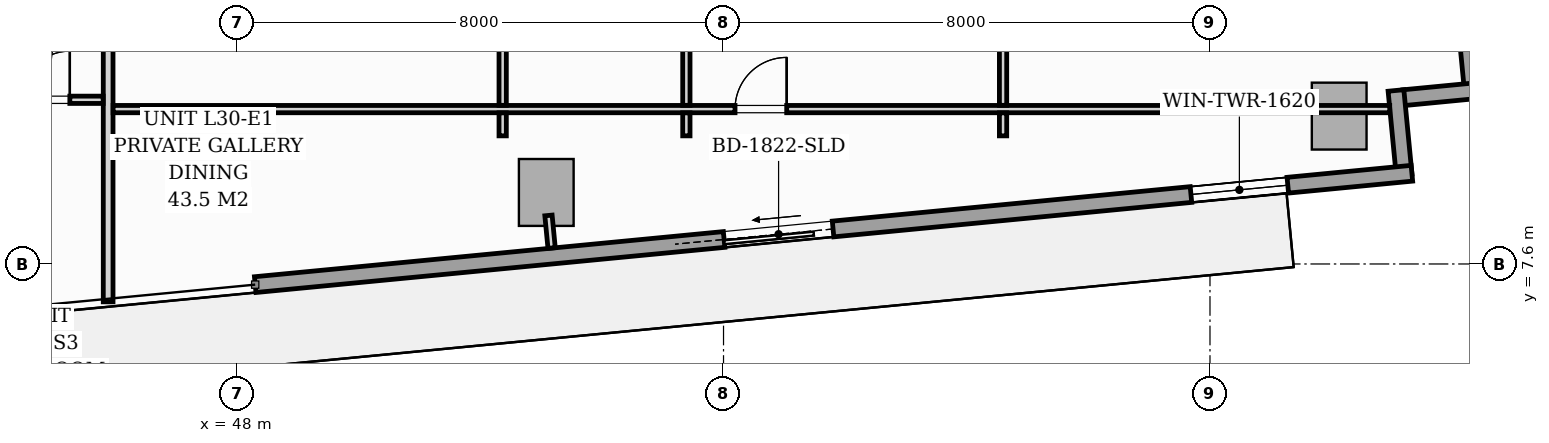
"""IFC4 building model, lengths in metres.
Left out: names, types, materials, properties, quantities, classifications, styles, units other than length and angle.
Written with IfcOpenShell. Run it as: python <this file> out.ifc"""

import sys

from ifc_helpers import new_model, si_unit, direction, frame, frame_2d, origin, origin_2d, place, context, subcontext, project, spatial, rectangle, extrude, source, transform, mapped, element, fill, save


model = new_model("IFC4")
c1 = context("Model", 3, precision=1e-05, world=origin(), true_north=direction((0.0, 1.0)))
c2 = subcontext(c1, "Body", "Model", "MODEL_VIEW")
j1 = project(units=[si_unit("LENGTHUNIT", "METRE"), si_unit("PLANEANGLEUNIT", "RADIAN")], contexts=[c1])
p1 = place(None, origin())
s1 = spatial("IfcSite", under=j1, at=p1, CompositionType="ELEMENT")
p2 = place(p1, origin())
s2 = spatial("IfcBuilding", under=s1, at=p2, CompositionType="ELEMENT")
p3 = place(p2, frame((0.0, 0.0, 106.6)))
s3 = spatial("IfcBuildingStorey", under=s2, at=p3, CompositionType="ELEMENT", Elevation=106.6)
m1 = source(origin(), c2, "Body", "SweptSolid", [
    extrude(rectangle(XDim=0.9, YDim=1.1, at=origin_2d()), origin(), (0.0, 0.0, 1.0), 3.196),
])
for number, where, z_axis, x_axis in (
    (1, (53.085, 8.776, 0.002), (0.0, 0.0, 1.0), (0.995, 0.096, 0.0)),
    (2, (66.125, 10.032, 0.002), (0.0, 0.0, 1.0), (0.995, 0.096, 0.0)),
):
    element("IfcColumn", number, at=place(p3, frame(where, z_axis=z_axis, x_axis=x_axis)), inside=s3, PredefinedType="COLUMN", context=c2, shape_type="MappedRepresentation", body=[
        mapped(m1, transform((0.0, 0.0, 0.0), scale=1.0)),
    ])
p4 = place(p3, frame((68.183, 11.817, 0.0), z_axis=(0.0, 0.0, 1.0), x_axis=(0.095915846097, -0.995389446633, 0.0)))
e3 = element("IfcWall", 3, at=p4, inside=s3, PredefinedType="STANDARD", context=c2, shape_type="SweptSolid", body=[
    extrude(rectangle(XDim=1.395, YDim=0.26, at=frame_2d((0.697, 0.0))), origin(), (0.0, 0.0, 1.0), 2.94),
])
p5 = place(p3, frame((68.574, 10.469, 0.0), z_axis=(0.0, 0.0, 1.0), x_axis=(-0.99540774648, -0.095725744959, 0.0)))
e4 = element("IfcWall", 4, at=p5, inside=s3, PredefinedType="STANDARD", context=c2, shape_type="SweptSolid", body=[
    extrude(rectangle(XDim=1.395, YDim=0.26, at=frame_2d((0.698, 0.0))), origin(), (0.0, 0.0, 1.0), 2.94),
])
p6 = place(p3, frame((67.059, 10.453, 0.0), z_axis=(0.0, 0.0, 1.0), x_axis=(0.095915846097, -0.995389446633, 0.0)))
e5 = element("IfcWall", 5, at=p6, inside=s3, PredefinedType="STANDARD", context=c2, shape_type="SweptSolid", body=[
    extrude(rectangle(XDim=1.395, YDim=0.26, at=frame_2d((0.697, 0.0))), origin(), (0.0, 0.0, 1.0), 2.94),
])
p7 = place(p3, frame((67.32, 9.092, 0.0), z_axis=(0.0, 0.0, 1.0), x_axis=(-0.995396521236, -0.095842399342, 0.0)))
e6 = element("IfcWall", 6, at=p7, inside=s3, PredefinedType="STANDARD", context=c2, shape_type="SweptSolid", body=[
    extrude(rectangle(XDim=19.11, YDim=0.26, at=frame_2d((9.555, 0.0))), origin(), (0.0, 0.0, 1.0), 2.94),
])
p8 = place(p7, frame((9.563, 0.0, 0.0)))
e7 = element("IfcOpeningElement", 7, at=p8, cuts=e6, PredefinedType="OPENING", context=c2, shape_type="SweptSolid", body=[
    extrude(rectangle(XDim=1.8, YDim=2.06, at=frame_2d((0.9, 1.03))), frame((0.0, 0.14, 0.0), z_axis=(0.0, -1.0, 0.0), x_axis=(1.0, 0.0, 0.0)), (0.0, 0.0, 1.0), 0.28),
])
p9 = place(p7, frame((2.05, 0.0, 0.65)))
e8 = element("IfcOpeningElement", 8, at=p9, cuts=e6, PredefinedType="OPENING", context=c2, shape_type="SweptSolid", body=[
    extrude(rectangle(XDim=1.6, YDim=1.5, at=frame_2d((0.8, 0.75))), frame((0.0, 0.14, 0.0), z_axis=(0.0, -1.0, 0.0), x_axis=(1.0, 0.0, 0.0)), (0.0, 0.0, 1.0), 0.28),
])
p10 = place(p3, frame((45.88, 6.977, 0.0), z_axis=(0.0, 0.0, 1.0), x_axis=(0.0, 1.0, 0.0)))
e9 = element("IfcWall", 9, at=p10, inside=s3, PredefinedType="PARTITIONING", context=c2, shape_type="SweptSolid", body=[
    extrude(rectangle(XDim=5.491, YDim=0.16, at=frame_2d((2.745, 0.0))), origin(), (0.0, 0.0, 1.0), 2.94),
])
p11 = place(p3, frame((41.7, 10.3, 0.0), z_axis=(0.0, 0.0, 1.0), x_axis=(1.0, 0.0, 0.0)))
e10 = element("IfcWall", 10, at=p11, inside=s3, PredefinedType="PARTITIONING", context=c2, shape_type="SweptSolid", body=[
    extrude(rectangle(XDim=4.098, YDim=0.12, at=frame_2d((2.049, 0.0))), origin(), (0.0, 0.0, 1.0), 2.94),
])
p12 = place(p11, frame((0.675, 0.0, 0.0)))
e11 = element("IfcOpeningElement", 11, at=p12, cuts=e10, PredefinedType="OPENING", context=c2, shape_type="SweptSolid", body=[
    extrude(rectangle(XDim=0.85, YDim=2.05, at=frame_2d((0.425, 1.025))), frame((0.0, 0.07, 0.0), z_axis=(0.0, -1.0, 0.0), x_axis=(1.0, 0.0, 0.0)), (0.0, 0.0, 1.0), 0.14),
])
p13 = place(p11, frame((2.75, 0.0, 0.0)))
e12 = element("IfcOpeningElement", 12, at=p13, cuts=e10, PredefinedType="OPENING", context=c2, shape_type="SweptSolid", body=[
    extrude(rectangle(XDim=0.8, YDim=2.02, at=frame_2d((0.4, 1.01))), frame((0.0, 0.07, 0.0), z_axis=(0.0, -1.0, 0.0), x_axis=(1.0, 0.0, 0.0)), (0.0, 0.0, 1.0), 0.14),
])
p14 = place(p3, frame((45.962, 10.147, 0.0), z_axis=(0.0, 0.0, 1.0), x_axis=(1.0, 0.0, 0.0)))
e13 = element("IfcWall", 13, at=p14, inside=s3, PredefinedType="PARTITIONING", context=c2, shape_type="SweptSolid", body=[
    extrude(rectangle(XDim=20.994, YDim=0.12, at=frame_2d((10.497, 0.0))), origin(), (0.0, 0.0, 1.0), 2.31),
])
p15 = place(p14, frame((10.227, 0.0, 0.0)))
e14 = element("IfcOpeningElement", 14, at=p15, cuts=e13, PredefinedType="OPENING", context=c2, shape_type="SweptSolid", body=[
    extrude(rectangle(XDim=0.85, YDim=2.05, at=frame_2d((0.425, 1.025))), frame((0.0, 0.07, 0.0), z_axis=(0.0, -1.0, 0.0), x_axis=(1.0, 0.0, 0.0)), (0.0, 0.0, 1.0), 0.14),
])
p16 = place(p3, frame((60.597, 9.707, 0.0), z_axis=(0.0, 0.0, 1.0), x_axis=(0.0, 1.0, 0.0)))
e15 = element("IfcWall", 15, at=p16, inside=s3, PredefinedType="PARTITIONING", context=c2, shape_type="SweptSolid", body=[
    extrude(rectangle(XDim=0.378, YDim=0.12, at=frame_2d((0.189, 0.0))), origin(), (0.0, 0.0, 1.0), 2.94),
])
p17 = place(p3, frame((60.597, 10.209, 0.0), z_axis=(0.0, 0.0, 1.0), x_axis=(0.0, 1.0, 0.0)))
e16 = element("IfcWall", 16, at=p17, inside=s3, PredefinedType="PARTITIONING", context=c2, shape_type="SweptSolid", body=[
    extrude(rectangle(XDim=11.087, YDim=0.12, at=frame_2d((5.543, 0.0))), origin(), (0.0, 0.0, 1.0), 2.94),
])
p18 = place(p17, frame((5.118, 0.0, 0.0)))
e17 = element("IfcOpeningElement", 17, at=p18, cuts=e16, PredefinedType="OPENING", context=c2, shape_type="SweptSolid", body=[
    extrude(rectangle(XDim=0.85, YDim=2.05, at=frame_2d((0.425, 1.025))), frame((0.0, 0.07, 0.0), z_axis=(0.0, -1.0, 0.0), x_axis=(1.0, 0.0, 0.0)), (0.0, 0.0, 1.0), 0.14),
])
p19 = place(p3, frame((55.389, 9.707, 0.0), z_axis=(0.0, 0.0, 1.0), x_axis=(0.0, 1.0, 0.0)))
e18 = element("IfcWall", 18, at=p19, inside=s3, PredefinedType="PARTITIONING", context=c2, shape_type="SweptSolid", body=[
    extrude(rectangle(XDim=0.378, YDim=0.12, at=frame_2d((0.189, 0.0))), origin(), (0.0, 0.0, 1.0), 2.94),
])
p20 = place(p3, frame((55.389, 10.209, 0.0), z_axis=(0.0, 0.0, 1.0), x_axis=(0.0, 1.0, 0.0)))
e19 = element("IfcWall", 19, at=p20, inside=s3, PredefinedType="PARTITIONING", context=c2, shape_type="SweptSolid", body=[
    extrude(rectangle(XDim=11.087, YDim=0.12, at=frame_2d((5.543, 0.0))), origin(), (0.0, 0.0, 1.0), 2.94),
])
p21 = place(p20, frame((5.118, 0.0, 0.0)))
e20 = element("IfcOpeningElement", 20, at=p21, cuts=e19, PredefinedType="OPENING", context=c2, shape_type="SweptSolid", body=[
    extrude(rectangle(XDim=0.85, YDim=2.05, at=frame_2d((0.425, 1.025))), frame((0.0, 0.07, 0.0), z_axis=(0.0, -1.0, 0.0), x_axis=(1.0, 0.0, 0.0)), (0.0, 0.0, 1.0), 0.14),
])
p22 = place(p3, frame((52.368, 9.707, 0.0), z_axis=(0.0, 0.0, 1.0), x_axis=(0.0, 1.0, 0.0)))
e21 = element("IfcWall", 21, at=p22, inside=s3, PredefinedType="PARTITIONING", context=c2, shape_type="SweptSolid", body=[
    extrude(rectangle(XDim=0.378, YDim=0.12, at=frame_2d((0.189, 0.0))), origin(), (0.0, 0.0, 1.0), 2.94),
])
p23 = place(p3, frame((52.368, 10.209, 0.0), z_axis=(0.0, 0.0, 1.0), x_axis=(0.0, 1.0, 0.0)))
e22 = element("IfcWall", 22, at=p23, inside=s3, PredefinedType="PARTITIONING", context=c2, shape_type="SweptSolid", body=[
    extrude(rectangle(XDim=11.087, YDim=0.12, at=frame_2d((5.543, 0.0))), origin(), (0.0, 0.0, 1.0), 2.94),
])
p24 = place(p23, frame((5.118, 0.0, 0.0)))
e23 = element("IfcOpeningElement", 23, at=p24, cuts=e22, PredefinedType="OPENING", context=c2, shape_type="SweptSolid", body=[
    extrude(rectangle(XDim=0.85, YDim=2.05, at=frame_2d((0.425, 1.025))), frame((0.0, 0.07, 0.0), z_axis=(0.0, -1.0, 0.0), x_axis=(1.0, 0.0, 0.0)), (0.0, 0.0, 1.0), 0.14),
])
p25 = place(p3, frame((53.121, 8.398, 0.0), z_axis=(0.0, 0.0, 1.0), x_axis=(0.096179204763, -0.995364034196, 0.0)))
e24 = element("IfcWall", 24, at=p25, inside=s3, PredefinedType="PARTITIONING", context=c2, shape_type="SweptSolid", body=[
    extrude(rectangle(XDim=0.538, YDim=0.12, at=frame_2d((0.269, 0.0))), origin(), (0.0, 0.0, 1.0), 2.94),
])
m2 = source(origin(), c2, "Body", "SweptSolid", [
    extrude(rectangle(XDim=1.8, YDim=2.06, at=frame_2d((0.9, 1.03))), frame((0.0, 0.025, 0.0), z_axis=(0.0, -1.0, 0.0), x_axis=(1.0, 0.0, 0.0)), (0.0, 0.0, 1.0), 0.05),
])
p26 = place(p8, origin())
e25 = element("IfcDoor", 25, at=p26, inside=s3, OperationType="SLIDING_TO_RIGHT", PredefinedType="DOOR", context=c2, shape_type="MappedRepresentation", body=[
    mapped(m2, transform((0.0, 0.0, 0.0), scale=1.0)),
])
fill(e7, e25)
m3 = source(origin(), c2, "Body", "SweptSolid", [
    extrude(rectangle(XDim=1.6, YDim=1.5, at=frame_2d((0.8, 0.75))), frame((0.0, 0.03, 0.0), z_axis=(0.0, -1.0, 0.0), x_axis=(1.0, 0.0, 0.0)), (0.0, 0.0, 1.0), 0.06),
])
p27 = place(p9, origin())
e26 = element("IfcWindow", 26, at=p27, inside=s3, PartitioningType="SINGLE_PANEL", PredefinedType="WINDOW", context=c2, shape_type="MappedRepresentation", body=[
    mapped(m3, transform((0.0, 0.0, 0.0), scale=1.0)),
])
fill(e8, e26)
m4 = source(origin(), c2, "Body", "SweptSolid", [
    extrude(rectangle(XDim=0.8, YDim=2.02, at=frame_2d((0.4, 1.01))), frame((0.0, 0.025, 0.0), z_axis=(0.0, -1.0, 0.0), x_axis=(1.0, 0.0, 0.0)), (0.0, 0.0, 1.0), 0.05),
])
p28 = place(p13, origin())
e27 = element("IfcDoor", 27, at=p28, inside=s3, OperationType="SINGLE_SWING_RIGHT", PredefinedType="DOOR", context=c2, shape_type="MappedRepresentation", body=[
    mapped(m4, transform((0.0, 0.0, 0.0), scale=1.0)),
])
fill(e12, e27)
m5 = source(origin(), c2, "Body", "SweptSolid", [
    extrude(rectangle(XDim=0.85, YDim=2.05, at=frame_2d((0.425, 1.025))), frame((0.0, 0.025, 0.0), z_axis=(0.0, -1.0, 0.0), x_axis=(1.0, 0.0, 0.0)), (0.0, 0.0, 1.0), 0.05),
])
p29 = place(p15, origin())
e28 = element("IfcDoor", 28, at=p29, inside=s3, OperationType="SINGLE_SWING_RIGHT", PredefinedType="DOOR", context=c2, shape_type="MappedRepresentation", body=[
    mapped(m5, transform((0.0, 0.0, 0.0), scale=1.0)),
])
fill(e14, e28)
save(model, sys.argv[1])
